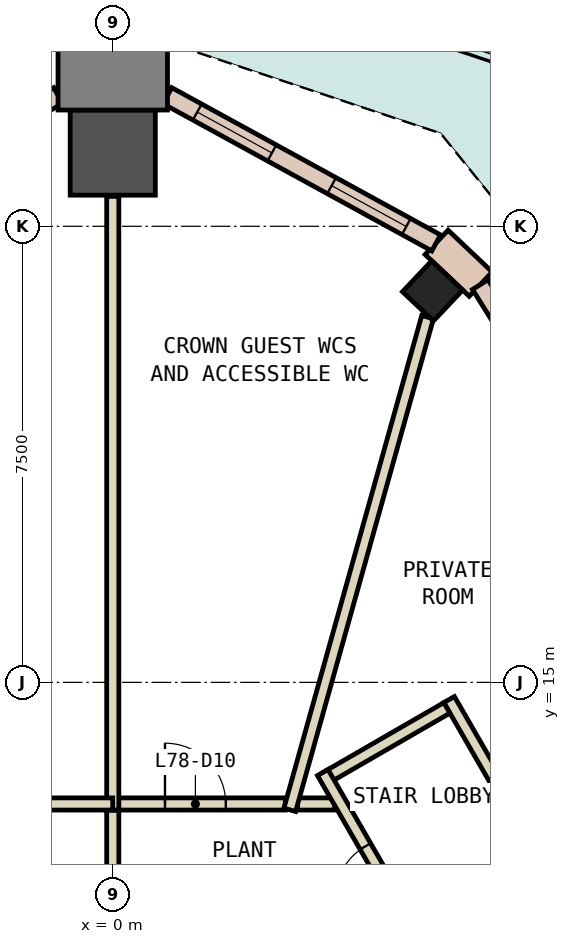
"""IFC4 building model, lengths in metres.
Left out: names, types, materials, properties, quantities, classifications, styles, units other than length and angle.
Written with IfcOpenShell. Run it as: python <this file> out.ifc"""

import sys

from ifc_helpers import new_model, si_unit, direction, frame, frame_2d, origin, origin_2d, place, context, subcontext, project, spatial, rectangle, extrude, element, fill, save


model = new_model("IFC4")
c1 = context("Model", 3, precision=1e-05, world=origin(), true_north=direction((0.0, 1.0)))
c2 = subcontext(c1, "Body", "Model", "MODEL_VIEW")
j1 = project(units=[si_unit("LENGTHUNIT", "METRE"), si_unit("PLANEANGLEUNIT", "RADIAN")], contexts=[c1])
p1 = place(None, origin())
s1 = spatial("IfcSite", under=j1, at=p1, CompositionType="ELEMENT")
p2 = place(p1, origin())
s2 = spatial("IfcBuilding", under=s1, at=p2, CompositionType="ELEMENT")
p3 = place(p2, frame((0.0, 0.0, 331.4)))
s3 = spatial("IfcBuildingStorey", under=s2, at=p3, CompositionType="ELEMENT", Elevation=331.4)
p4 = place(p3, frame((5.26, 21.438, 0.0), z_axis=(0.0, 0.0, 1.0), x_axis=(-0.726658609123, 0.686998737835, 0.0)))
e1 = element("IfcColumn", 1, at=p4, inside=s3, PredefinedType="COLUMN", context=c2, shape_type="SweptSolid", body=[
    extrude(rectangle(XDim=0.7, YDim=0.7, at=origin_2d()), origin(), (0.0, 0.0, 1.0), 4.15),
])
p5 = place(p3, frame((0.0, 23.712, 0.0), z_axis=(0.0, 0.0, 1.0), x_axis=(0.0, 1.0, 0.0)))
e2 = element("IfcColumn", 2, at=p5, inside=s3, PredefinedType="COLUMN", context=c2, shape_type="SweptSolid", body=[
    extrude(rectangle(XDim=1.4, YDim=1.4, at=origin_2d()), origin(), (0.0, 0.0, 1.0), 4.15),
])
p6 = place(p3, frame((0.0, 25.312, 0.0), z_axis=(0.0, 0.0, 1.0), x_axis=(0.0, 1.0, 0.0)))
e3 = element("IfcColumn", 3, at=p6, inside=s3, PredefinedType="COLUMN", context=c2, shape_type="SweptSolid", body=[
    extrude(rectangle(XDim=1.8, YDim=1.8, at=origin_2d()), origin(), (0.0, 0.0, 1.0), 4.15),
])
p7 = place(p3, frame((6.052, 21.549, 0.0), z_axis=(0.0, 0.0, 1.0), x_axis=(-0.726376136967, 0.687297393888, 0.0)))
e4 = element("IfcWall", 4, at=p7, inside=s3, PredefinedType="STANDARD", context=c2, shape_type="SweptSolid", body=[
    extrude(rectangle(XDim=1.0, YDim=0.55, at=frame_2d((0.5, 0.0))), origin(), (0.0, 0.0, 1.0), 4.15),
])
p8 = place(p3, frame((9.769, 15.564, 0.0), z_axis=(0.0, 0.0, 1.0), x_axis=(-0.528920387505, 0.848671446251, 0.0)))
e5 = element("IfcWall", 5, at=p8, inside=s3, PredefinedType="STANDARD", context=c2, shape_type="SweptSolid", body=[
    extrude(rectangle(XDim=7.043, YDim=0.3, at=frame_2d((3.521, 0.0))), origin(), (0.0, 0.0, 1.0), 4.15),
])
p9 = place(p8, frame((0.561, 0.0, 0.9)))
e6 = element("IfcOpeningElement", 6, at=p9, cuts=e5, PredefinedType="OPENING", context=c2, shape_type="SweptSolid", body=[
    extrude(rectangle(XDim=2.4, YDim=3.0, at=frame_2d((1.2, 1.5))), frame((0.0, 0.16, 0.0), z_axis=(0.0, -1.0, 0.0), x_axis=(1.0, 0.0, 0.0)), (0.0, 0.0, 1.0), 0.32),
])
p10 = place(p8, frame((4.082, 0.0, 0.9)))
e7 = element("IfcOpeningElement", 7, at=p10, cuts=e5, PredefinedType="OPENING", context=c2, shape_type="SweptSolid", body=[
    extrude(rectangle(XDim=2.4, YDim=3.0, at=frame_2d((1.2, 1.5))), frame((0.0, 0.16, 0.0), z_axis=(0.0, -1.0, 0.0), x_axis=(1.0, 0.0, 0.0)), (0.0, 0.0, 1.0), 0.32),
])
p11 = place(p3, frame((5.319, 22.227, 0.0), z_axis=(0.0, 0.0, 1.0), x_axis=(-0.877068569324, 0.480365199305, 0.0)))
e8 = element("IfcWall", 8, at=p11, inside=s3, PredefinedType="STANDARD", context=c2, shape_type="SweptSolid", body=[
    extrude(rectangle(XDim=5.04, YDim=0.3, at=frame_2d((2.52, 0.0))), origin(), (0.0, 0.0, 1.0), 4.15),
])
p12 = place(p11, frame((0.56, 0.0, 0.9)))
e9 = element("IfcOpeningElement", 9, at=p12, cuts=e8, PredefinedType="OPENING", context=c2, shape_type="SweptSolid", body=[
    extrude(rectangle(XDim=1.4, YDim=3.0, at=frame_2d((0.7, 1.5))), frame((0.0, 0.16, 0.0), z_axis=(0.0, -1.0, 0.0), x_axis=(1.0, 0.0, 0.0)), (0.0, 0.0, 1.0), 0.32),
])
p13 = place(p11, frame((3.08, 0.0, 0.9)))
e10 = element("IfcOpeningElement", 10, at=p13, cuts=e8, PredefinedType="OPENING", context=c2, shape_type="SweptSolid", body=[
    extrude(rectangle(XDim=1.4, YDim=3.0, at=frame_2d((0.7, 1.5))), frame((0.0, 0.16, 0.0), z_axis=(0.0, -1.0, 0.0), x_axis=(1.0, 0.0, 0.0)), (0.0, 0.0, 1.0), 0.32),
])
p14 = place(p3, frame((-0.899, 24.648, 0.0), z_axis=(0.0, 0.0, 1.0), x_axis=(-0.877068569324, -0.480365199305, 0.0)))
e11 = element("IfcWall", 11, at=p14, inside=s3, PredefinedType="STANDARD", context=c2, shape_type="SweptSolid", body=[
    extrude(rectangle(XDim=5.04, YDim=0.3, at=frame_2d((2.52, 0.0))), origin(), (0.0, 0.0, 1.0), 4.15),
])
p15 = place(p14, frame((0.56, 0.0, 0.9)))
e12 = element("IfcOpeningElement", 12, at=p15, cuts=e11, PredefinedType="OPENING", context=c2, shape_type="SweptSolid", body=[
    extrude(rectangle(XDim=1.4, YDim=3.0, at=frame_2d((0.7, 1.5))), frame((0.0, 0.16, 0.0), z_axis=(0.0, -1.0, 0.0), x_axis=(1.0, 0.0, 0.0)), (0.0, 0.0, 1.0), 0.32),
])
p16 = place(p14, frame((3.08, 0.0, 0.9)))
e13 = element("IfcOpeningElement", 13, at=p16, cuts=e11, PredefinedType="OPENING", context=c2, shape_type="SweptSolid", body=[
    extrude(rectangle(XDim=1.4, YDim=3.0, at=frame_2d((0.7, 1.5))), frame((0.0, 0.16, 0.0), z_axis=(0.0, -1.0, 0.0), x_axis=(1.0, 0.0, 0.0)), (0.0, 0.0, 1.0), 0.32),
])
p17 = place(p3, frame((5.532, 14.717, 0.0), z_axis=(0.0, 0.0, 1.0), x_axis=(0.499968011863, -0.866043871356, 0.0)))
e14 = element("IfcWall", 14, at=p17, inside=s3, PredefinedType="PARTITIONING", context=c2, shape_type="SweptSolid", body=[
    extrude(rectangle(XDim=7.201, YDim=0.2, at=frame_2d((3.6, 0.0))), origin(), (0.0, 0.0, 1.0), 4.15),
])
p18 = place(p17, frame((2.68, 0.0, 0.0)))
e15 = element("IfcOpeningElement", 15, at=p18, cuts=e14, PredefinedType="OPENING", context=c2, shape_type="SweptSolid", body=[
    extrude(rectangle(XDim=1.0, YDim=2.1, at=frame_2d((0.5, 1.05))), frame((0.0, 0.11, 0.0), z_axis=(0.0, -1.0, 0.0), x_axis=(1.0, 0.0, 0.0)), (0.0, 0.0, 1.0), 0.22),
])
p19 = place(p3, frame((3.504, 13.43, 0.0), z_axis=(0.0, 0.0, 1.0), x_axis=(0.865927408828, 0.500169693844, 0.0)))
e16 = element("IfcWall", 16, at=p19, inside=s3, PredefinedType="PARTITIONING", context=c2, shape_type="SweptSolid", body=[
    extrude(rectangle(XDim=2.3, YDim=0.2, at=frame_2d((1.15, 0.0))), origin(), (0.0, 0.0, 1.0), 4.15),
])
p20 = place(p3, frame((3.038, 13.0, 0.0), z_axis=(0.0, 0.0, 1.0), x_axis=(1.0, 0.0, 0.0)))
e17 = element("IfcWall", 17, at=p20, inside=s3, PredefinedType="PARTITIONING", context=c2, shape_type="SweptSolid", body=[
    extrude(rectangle(XDim=0.614, YDim=0.2, at=frame_2d((0.307, 0.0))), origin(), (0.0, 0.0, 1.0), 4.15),
])
p21 = place(p3, frame((0.0, 13.0, 0.0), z_axis=(0.0, 0.0, 1.0), x_axis=(1.0, 0.0, 0.0)))
e18 = element("IfcWall", 18, at=p21, inside=s3, PredefinedType="PARTITIONING", context=c2, shape_type="SweptSolid", body=[
    extrude(rectangle(XDim=2.838, YDim=0.2, at=frame_2d((1.419, 0.0))), origin(), (0.0, 0.0, 1.0), 4.15),
])
p22 = place(p21, frame((0.859, 0.0, 0.0)))
e19 = element("IfcOpeningElement", 19, at=p22, cuts=e18, PredefinedType="OPENING", context=c2, shape_type="SweptSolid", body=[
    extrude(rectangle(XDim=1.0, YDim=2.1, at=frame_2d((0.5, 1.05))), frame((0.0, 0.11, 0.0), z_axis=(0.0, -1.0, 0.0), x_axis=(1.0, 0.0, 0.0)), (0.0, 0.0, 1.0), 0.22),
])
p23 = place(p3, frame((0.0, 11.0, 0.0), z_axis=(0.0, 0.0, 1.0), x_axis=(0.0, 1.0, 0.0)))
e20 = element("IfcWall", 20, at=p23, inside=s3, PredefinedType="PARTITIONING", context=c2, shape_type="SweptSolid", body=[
    extrude(rectangle(XDim=1.9, YDim=0.2, at=frame_2d((0.95, 0.0))), origin(), (0.0, 0.0, 1.0), 4.15),
])
p24 = place(p3, frame((2.911, 12.904, 0.0), z_axis=(0.0, 0.0, 1.0), x_axis=(0.269466315524, 0.963009815525, 0.0)))
e21 = element("IfcWall", 21, at=p24, inside=s3, PredefinedType="PARTITIONING", context=c2, shape_type="SweptSolid", body=[
    extrude(rectangle(XDim=8.413, YDim=0.2, at=frame_2d((4.207, 0.0))), origin(), (0.0, 0.0, 1.0), 4.15),
])
p25 = place(p3, frame((0.0, 12.9, 0.0), z_axis=(0.0, 0.0, 1.0), x_axis=(0.0, 1.0, 0.0)))
e22 = element("IfcWall", 22, at=p25, inside=s3, PredefinedType="PARTITIONING", context=c2, shape_type="SweptSolid", body=[
    extrude(rectangle(XDim=10.092, YDim=0.2, at=frame_2d((5.046, 0.0))), origin(), (0.0, 0.0, 1.0), 4.15),
])
p26 = place(p3, frame((-5.962, 13.0, 0.0), z_axis=(0.0, 0.0, 1.0), x_axis=(1.0, 0.0, 0.0)))
e23 = element("IfcWall", 23, at=p26, inside=s3, PredefinedType="PARTITIONING", context=c2, shape_type="SweptSolid", body=[
    extrude(rectangle(XDim=5.962, YDim=0.2, at=frame_2d((2.981, 0.0))), origin(), (0.0, 0.0, 1.0), 4.15),
])
p27 = place(p3, frame((4.822, 11.147, 0.0), z_axis=(0.0, 0.0, 1.0), x_axis=(-0.499871764879, 0.866099427708, 0.0)))
e24 = element("IfcWall", 24, at=p27, inside=s3, PredefinedType="PARTITIONING", context=c2, shape_type="SweptSolid", body=[
    extrude(rectangle(XDim=2.737, YDim=0.2, at=frame_2d((1.368, 0.0))), origin(), (0.0, 0.0, 1.0), 4.15),
])
p28 = place(p27, frame((0.335, 0.0, 0.0)))
e25 = element("IfcOpeningElement", 25, at=p28, cuts=e24, PredefinedType="OPENING", context=c2, shape_type="SweptSolid", body=[
    extrude(rectangle(XDim=1.0, YDim=2.1, at=frame_2d((0.5, 1.05))), frame((0.0, 0.11, 0.0), z_axis=(0.0, -1.0, 0.0), x_axis=(1.0, 0.0, 0.0)), (0.0, 0.0, 1.0), 0.22),
])
p29 = place(p12, origin())
e26 = element("IfcWindow", 26, at=p29, inside=s3, PartitioningType="SINGLE_PANEL", PredefinedType="WINDOW", context=c2, shape_type="SweptSolid", body=[
    extrude(rectangle(XDim=1.4, YDim=3.0, at=frame_2d((0.7, 1.5))), frame((0.0, 0.03, 0.0), z_axis=(0.0, -1.0, 0.0), x_axis=(1.0, 0.0, 0.0)), (0.0, 0.0, 1.0), 0.06),
])
fill(e9, e26)
p30 = place(p13, origin())
e27 = element("IfcWindow", 27, at=p30, inside=s3, PartitioningType="SINGLE_PANEL", PredefinedType="WINDOW", context=c2, shape_type="SweptSolid", body=[
    extrude(rectangle(XDim=1.4, YDim=3.0, at=frame_2d((0.7, 1.5))), frame((0.0, 0.03, 0.0), z_axis=(0.0, -1.0, 0.0), x_axis=(1.0, 0.0, 0.0)), (0.0, 0.0, 1.0), 0.06),
])
fill(e10, e27)
p31 = place(p28, origin())
e28 = element("IfcDoor", 28, at=p31, inside=s3, OperationType="SINGLE_SWING_RIGHT", PredefinedType="DOOR", context=c2, shape_type="SweptSolid", body=[
    extrude(rectangle(XDim=1.0, YDim=2.1, at=frame_2d((0.5, 1.05))), frame((0.0, 0.025, 0.0), z_axis=(0.0, -1.0, 0.0), x_axis=(1.0, 0.0, 0.0)), (0.0, 0.0, 1.0), 0.05),
])
fill(e25, e28)
p32 = place(p22, origin())
e29 = element("IfcDoor", 29, at=p32, inside=s3, OperationType="SINGLE_SWING_LEFT", PredefinedType="DOOR", context=c2, shape_type="SweptSolid", body=[
    extrude(rectangle(XDim=1.0, YDim=2.1, at=frame_2d((0.5, 1.05))), frame((0.0, 0.025, 0.0), z_axis=(0.0, -1.0, 0.0), x_axis=(1.0, 0.0, 0.0)), (0.0, 0.0, 1.0), 0.05),
])
fill(e19, e29)
save(model, sys.argv[1])
